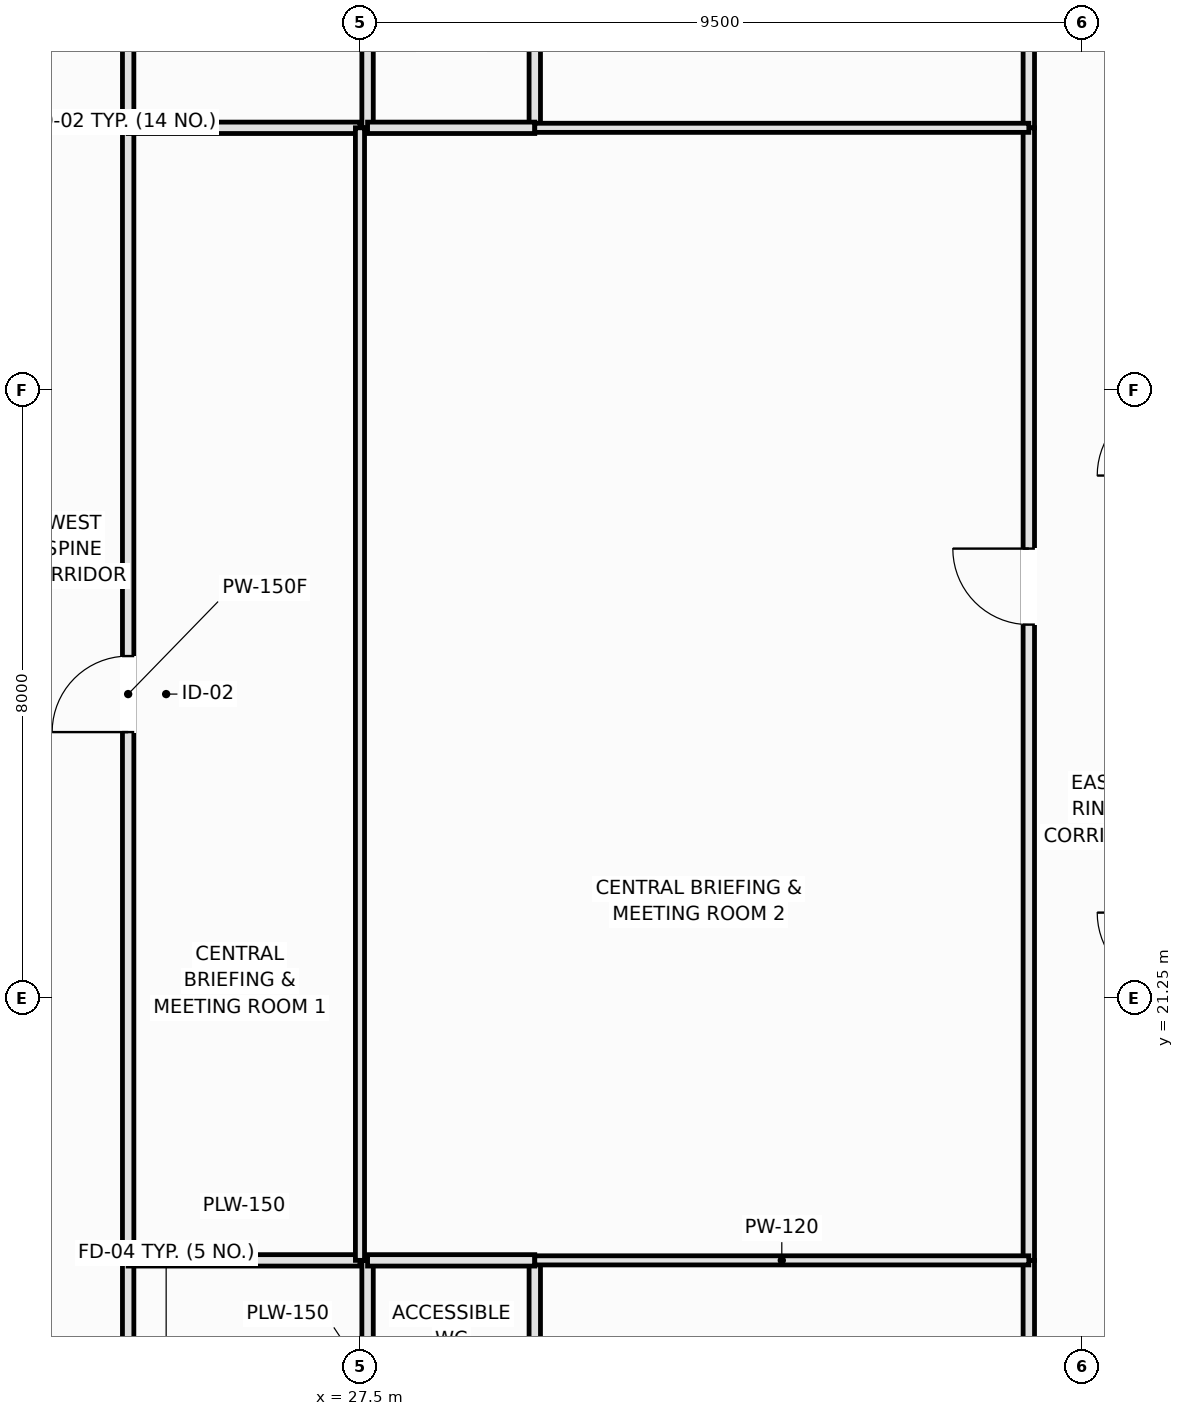
"""IFC4 building model, lengths in metres.
Left out: names, types, materials, properties, quantities, classifications, styles, units other than length and angle.
Written with IfcOpenShell. Run it as: python <this file> out.ifc"""

import sys

from ifc_helpers import new_model, si_unit, direction, frame, frame_2d, origin, place, context, subcontext, project, spatial, rectangle, extrude, element, fill, save


model = new_model("IFC4")
c1 = context("Model", 3, precision=1e-05, world=origin(), true_north=direction((0.0, 1.0)))
c2 = subcontext(c1, "Body", "Model", "MODEL_VIEW")
j1 = project(units=[si_unit("LENGTHUNIT", "METRE"), si_unit("PLANEANGLEUNIT", "RADIAN")], contexts=[c1])
p1 = place(None, origin())
s1 = spatial("IfcSite", under=j1, at=p1, CompositionType="ELEMENT")
p2 = place(p1, origin())
s2 = spatial("IfcBuilding", under=s1, at=p2, CompositionType="ELEMENT")
p3 = place(p2, frame((0.0, 0.0, 32.7)))
s3 = spatial("IfcBuildingStorey", under=s2, at=p3, CompositionType="ELEMENT", Elevation=32.7)
p4 = place(p3, frame((24.45, 14.7, 0.0), z_axis=(0.0, 0.0, 1.0), x_axis=(0.0, 1.0, 0.0)))
e1 = element("IfcWall", 1, at=p4, inside=s3, PredefinedType="PLUMBINGWALL", context=c2, shape_type="SweptSolid", body=[
    extrude(rectangle(XDim=3.1, YDim=0.15, at=frame_2d((1.55, 0.0))), origin(), (0.0, 0.0, 1.0), 3.37),
])
p5 = place(p4, frame((1.1, 0.0, 0.0)))
e2 = element("IfcOpeningElement", 2, at=p5, cuts=e1, PredefinedType="OPENING", context=c2, shape_type="SweptSolid", body=[
    extrude(rectangle(XDim=0.9, YDim=2.1, at=frame_2d((0.45, 1.05))), frame((0.0, 0.085, 0.0), z_axis=(0.0, -1.0, 0.0), x_axis=(1.0, 0.0, 0.0)), (0.0, 0.0, 1.0), 0.17),
])
p6 = place(p3, frame((24.45, 32.7, 0.0), z_axis=(0.0, 0.0, 1.0), x_axis=(0.0, 1.0, 0.0)))
e3 = element("IfcWall", 3, at=p6, inside=s3, PredefinedType="PLUMBINGWALL", context=c2, shape_type="SweptSolid", body=[
    extrude(rectangle(XDim=3.1, YDim=0.15, at=frame_2d((1.55, 0.0))), origin(), (0.0, 0.0, 1.0), 3.37),
])
p7 = place(p6, frame((1.1, 0.0, 0.0)))
e4 = element("IfcOpeningElement", 4, at=p7, cuts=e3, PredefinedType="OPENING", context=c2, shape_type="SweptSolid", body=[
    extrude(rectangle(XDim=0.9, YDim=2.1, at=frame_2d((0.45, 1.05))), frame((0.0, 0.085, 0.0), z_axis=(0.0, -1.0, 0.0), x_axis=(1.0, 0.0, 0.0)), (0.0, 0.0, 1.0), 0.17),
])
p8 = place(p3, frame((24.45, 17.8, 0.0), z_axis=(0.0, 0.0, 1.0), x_axis=(0.0, 1.0, 0.0)))
e5 = element("IfcWall", 5, at=p8, inside=s3, PredefinedType="PARTITIONING", context=c2, shape_type="SweptSolid", body=[
    extrude(rectangle(XDim=14.9, YDim=0.15, at=frame_2d((7.45, 0.0))), origin(), (0.0, 0.0, 1.0), 3.37),
])
p9 = place(p8, frame((6.95, 0.0, 0.0)))
e6 = element("IfcOpeningElement", 6, at=p9, cuts=e5, PredefinedType="OPENING", context=c2, shape_type="SweptSolid", body=[
    extrude(rectangle(XDim=1.0, YDim=2.15, at=frame_2d((0.5, 1.075))), frame((0.0, 0.085, 0.0), z_axis=(0.0, -1.0, 0.0), x_axis=(1.0, 0.0, 0.0)), (0.0, 0.0, 1.0), 0.17),
])
p10 = place(p3, frame((36.3, 14.7, 0.0), z_axis=(0.0, 0.0, 1.0), x_axis=(0.0, 1.0, 0.0)))
e7 = element("IfcWall", 7, at=p10, inside=s3, PredefinedType="PARTITIONING", context=c2, shape_type="SweptSolid", body=[
    extrude(rectangle(XDim=3.1, YDim=0.15, at=frame_2d((1.55, 0.0))), origin(), (0.0, 0.0, 1.0), 3.37),
])
p11 = place(p10, frame((1.05, 0.0, 0.0)))
e8 = element("IfcOpeningElement", 8, at=p11, cuts=e7, PredefinedType="OPENING", context=c2, shape_type="SweptSolid", body=[
    extrude(rectangle(XDim=1.0, YDim=2.15, at=frame_2d((0.5, 1.075))), frame((0.0, 0.085, 0.0), z_axis=(0.0, -1.0, 0.0), x_axis=(1.0, 0.0, 0.0)), (0.0, 0.0, 1.0), 0.17),
])
p12 = place(p3, frame((36.3, 32.7, 0.0), z_axis=(0.0, 0.0, 1.0), x_axis=(0.0, 1.0, 0.0)))
e9 = element("IfcWall", 9, at=p12, inside=s3, PredefinedType="PARTITIONING", context=c2, shape_type="SweptSolid", body=[
    extrude(rectangle(XDim=3.1, YDim=0.15, at=frame_2d((1.55, 0.0))), origin(), (0.0, 0.0, 1.0), 3.37),
])
p13 = place(p12, frame((1.05, 0.0, 0.0)))
e10 = element("IfcOpeningElement", 10, at=p13, cuts=e9, PredefinedType="OPENING", context=c2, shape_type="SweptSolid", body=[
    extrude(rectangle(XDim=1.0, YDim=2.15, at=frame_2d((0.5, 1.075))), frame((0.0, 0.085, 0.0), z_axis=(0.0, -1.0, 0.0), x_axis=(1.0, 0.0, 0.0)), (0.0, 0.0, 1.0), 0.17),
])
p14 = place(p3, frame((36.3, 17.8, 0.0), z_axis=(0.0, 0.0, 1.0), x_axis=(0.0, 1.0, 0.0)))
e11 = element("IfcWall", 11, at=p14, inside=s3, PredefinedType="PARTITIONING", context=c2, shape_type="SweptSolid", body=[
    extrude(rectangle(XDim=14.9, YDim=0.15, at=frame_2d((7.45, 0.0))), origin(), (0.0, 0.0, 1.0), 3.37),
])
p15 = place(p14, frame((8.364, 0.0, 0.0)))
e12 = element("IfcOpeningElement", 12, at=p15, cuts=e11, PredefinedType="OPENING", context=c2, shape_type="SweptSolid", body=[
    extrude(rectangle(XDim=1.0, YDim=2.15, at=frame_2d((0.5, 1.075))), frame((0.0, 0.085, 0.0), z_axis=(0.0, -1.0, 0.0), x_axis=(1.0, 0.0, 0.0)), (0.0, 0.0, 1.0), 0.17),
])
p16 = place(p3, frame((27.6, 14.7, 0.0), z_axis=(0.0, 0.0, 1.0), x_axis=(0.0, 1.0, 0.0)))
e13 = element("IfcWall", 13, at=p16, inside=s3, PredefinedType="PLUMBINGWALL", context=c2, shape_type="SweptSolid", body=[
    extrude(rectangle(XDim=3.1, YDim=0.15, at=frame_2d((1.55, 0.0))), origin(), (0.0, 0.0, 1.0), 3.37),
])
p17 = place(p3, frame((24.45, 17.8, 0.0), z_axis=(0.0, 0.0, 1.0), x_axis=(1.0, 0.0, 0.0)))
e14 = element("IfcWall", 14, at=p17, inside=s3, PredefinedType="PLUMBINGWALL", context=c2, shape_type="SweptSolid", body=[
    extrude(rectangle(XDim=3.05, YDim=0.15, at=frame_2d((1.525, 0.0))), origin(), (0.0, 0.0, 1.0), 3.37),
])
p18 = place(p3, frame((27.6, 32.7, 0.0), z_axis=(0.0, 0.0, 1.0), x_axis=(0.0, 1.0, 0.0)))
e15 = element("IfcWall", 15, at=p18, inside=s3, PredefinedType="PLUMBINGWALL", context=c2, shape_type="SweptSolid", body=[
    extrude(rectangle(XDim=3.1, YDim=0.15, at=frame_2d((1.55, 0.0))), origin(), (0.0, 0.0, 1.0), 3.37),
])
p19 = place(p3, frame((24.45, 32.7, 0.0), z_axis=(0.0, 0.0, 1.0), x_axis=(1.0, 0.0, 0.0)))
e16 = element("IfcWall", 16, at=p19, inside=s3, PredefinedType="PLUMBINGWALL", context=c2, shape_type="SweptSolid", body=[
    extrude(rectangle(XDim=3.05, YDim=0.15, at=frame_2d((1.525, 0.0))), origin(), (0.0, 0.0, 1.0), 3.37),
])
p20 = place(p3, frame((29.8, 14.7, 0.0), z_axis=(0.0, 0.0, 1.0), x_axis=(0.0, 1.0, 0.0)))
e17 = element("IfcWall", 17, at=p20, inside=s3, PredefinedType="PLUMBINGWALL", context=c2, shape_type="SweptSolid", body=[
    extrude(rectangle(XDim=3.1, YDim=0.15, at=frame_2d((1.55, 0.0))), origin(), (0.0, 0.0, 1.0), 3.37),
])
p21 = place(p3, frame((27.6, 17.8, 0.0), z_axis=(0.0, 0.0, 1.0), x_axis=(1.0, 0.0, 0.0)))
e18 = element("IfcWall", 18, at=p21, inside=s3, PredefinedType="PLUMBINGWALL", context=c2, shape_type="SweptSolid", body=[
    extrude(rectangle(XDim=2.2, YDim=0.15, at=frame_2d((1.1, 0.0))), origin(), (0.0, 0.0, 1.0), 3.37),
])
p22 = place(p3, frame((29.8, 32.7, 0.0), z_axis=(0.0, 0.0, 1.0), x_axis=(0.0, 1.0, 0.0)))
e19 = element("IfcWall", 19, at=p22, inside=s3, PredefinedType="PLUMBINGWALL", context=c2, shape_type="SweptSolid", body=[
    extrude(rectangle(XDim=3.1, YDim=0.15, at=frame_2d((1.55, 0.0))), origin(), (0.0, 0.0, 1.0), 3.37),
])
p23 = place(p3, frame((27.6, 32.7, 0.0), z_axis=(0.0, 0.0, 1.0), x_axis=(1.0, 0.0, 0.0)))
e20 = element("IfcWall", 20, at=p23, inside=s3, PredefinedType="PLUMBINGWALL", context=c2, shape_type="SweptSolid", body=[
    extrude(rectangle(XDim=2.2, YDim=0.15, at=frame_2d((1.1, 0.0))), origin(), (0.0, 0.0, 1.0), 3.37),
])
for number, where, z_axis, x_axis in (
    (21, (29.8, 17.8, 0.0), (0.0, 0.0, 1.0), (1.0, 0.0, 0.0)),
    (22, (29.8, 32.7, 0.0), (0.0, 0.0, 1.0), (1.0, 0.0, 0.0)),
):
    element("IfcWall", number, at=place(p3, frame(where, z_axis=z_axis, x_axis=x_axis)), inside=s3, PredefinedType="PARTITIONING", context=c2, shape_type="SweptSolid", body=[
        extrude(rectangle(XDim=6.5, YDim=0.12, at=frame_2d((3.25, 0.0))), origin(), (0.0, 0.0, 1.0), 3.37),
    ])
p24 = place(p3, frame((27.5, 17.8, 0.0), z_axis=(0.0, 0.0, 1.0), x_axis=(0.0, 1.0, 0.0)))
e23 = element("IfcWall", 23, at=p24, inside=s3, PredefinedType="PARTITIONING", context=c2, shape_type="SweptSolid", body=[
    extrude(rectangle(XDim=14.9, YDim=0.12, at=frame_2d((7.45, 0.0))), origin(), (0.0, 0.0, 1.0), 3.37),
])
p25 = place(p9, origin())
e24 = element("IfcDoor", 24, at=p25, inside=s3, OperationType="SINGLE_SWING_LEFT", PredefinedType="DOOR", context=c2, shape_type="SweptSolid", body=[
    extrude(rectangle(XDim=1.0, YDim=2.15, at=frame_2d((0.5, 1.075))), frame((0.0, 0.025, 0.0), z_axis=(0.0, -1.0, 0.0), x_axis=(1.0, 0.0, 0.0)), (0.0, 0.0, 1.0), 0.05),
])
fill(e6, e24)
p26 = place(p15, origin())
e25 = element("IfcDoor", 25, at=p26, inside=s3, OperationType="SINGLE_SWING_RIGHT", PredefinedType="DOOR", context=c2, shape_type="SweptSolid", body=[
    extrude(rectangle(XDim=1.0, YDim=2.15, at=frame_2d((0.5, 1.075))), frame((0.0, 0.025, 0.0), z_axis=(0.0, -1.0, 0.0), x_axis=(1.0, 0.0, 0.0)), (0.0, 0.0, 1.0), 0.05),
])
fill(e12, e25)
save(model, sys.argv[1])
